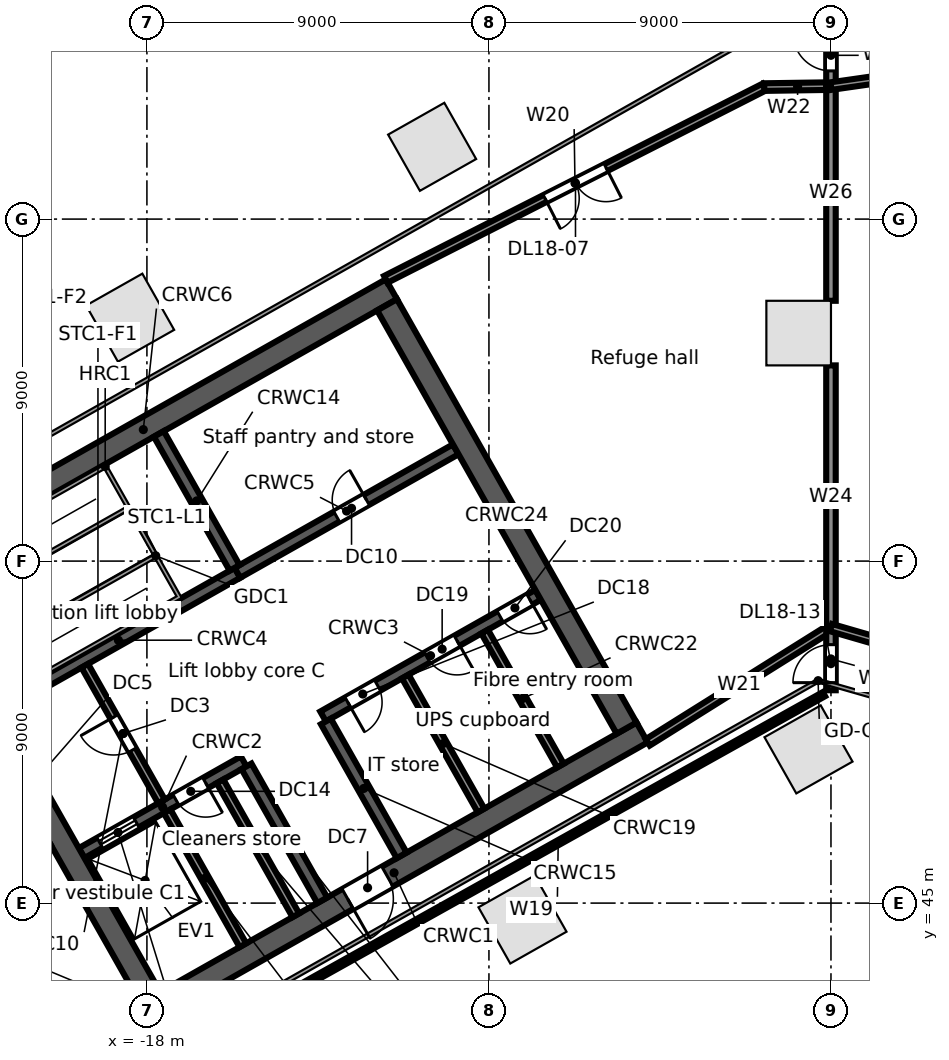
"""IFC4 building model, lengths in metres.
Left out: names, types, materials, properties, quantities, classifications, styles, units other than length and angle.
Written with IfcOpenShell. Run it as: python <this file> out.ifc"""

import sys

from ifc_helpers import new_model, si_unit, direction, frame, frame_2d, origin, origin_2d, place, context, subcontext, project, spatial, rectangle, extrude, element, fill, save


model = new_model("IFC4")
c1 = context("Model", 3, precision=1e-05, world=origin(), true_north=direction((0.0, 1.0)))
c2 = subcontext(c1, "Body", "Model", "MODEL_VIEW")
j1 = project(units=[si_unit("LENGTHUNIT", "METRE"), si_unit("PLANEANGLEUNIT", "RADIAN")], contexts=[c1])
p1 = place(None, origin())
s1 = spatial("IfcSite", under=j1, at=p1, CompositionType="ELEMENT")
p2 = place(p1, origin())
s2 = spatial("IfcBuilding", under=s1, at=p2, CompositionType="ELEMENT")
p3 = place(p2, frame((0.0, 0.0, 91.5)))
s3 = spatial("IfcBuildingStorey", under=s2, at=p3, CompositionType="ELEMENT", Elevation=91.5)
for number, where, z_axis, x_axis in (
    (1, (-10.495, 64.902, 0.0), (0.0, 0.0, 1.0), (-0.87, -0.492, 0.0)),
    (2, (-18.441, 60.406, 0.0), (0.0, 0.0, 1.0), (-0.87, -0.492, 0.0)),
    (3, (-8.117, 44.568, 0.0), (0.0, 0.0, 1.0), (0.87, 0.492, 0.0)),
    (4, (-0.591, 49.044, 0.0), (0.0, 0.0, 1.0), (0.87, 0.492, 0.0)),
    (5, (-0.85, 60.0, 0.0), (0.0, 0.0, 1.0), (0.0, 1.0, 0.0)),
):
    element("IfcColumn", number, at=place(p3, frame(where, z_axis=z_axis, x_axis=x_axis)), inside=s3, PredefinedType="COLUMN", context=c2, shape_type="SweptSolid", body=[
        extrude(rectangle(XDim=1.7, YDim=1.7, at=origin_2d()), origin(), (0.0, 0.0, 1.0), 5.6),
    ])
p4 = place(p3, frame((-18.024, 42.104, 0.0), z_axis=(0.0, 0.0, 1.0), x_axis=(0.870360574057, 0.492414937962, 0.0)))
e6 = element("IfcWall", 6, at=p4, inside=s3, PredefinedType="SOLIDWALL", context=c2, shape_type="SweptSolid", body=[
    extrude(rectangle(XDim=15.0, YDim=0.6, at=frame_2d((7.5, 0.0))), origin(), (0.0, 0.0, 1.0), 5.28),
])
p5 = place(p4, frame((6.1, 0.0, 0.0)))
e7 = element("IfcOpeningElement", 7, at=p5, cuts=e6, PredefinedType="OPENING", context=c2, shape_type="SweptSolid", body=[
    extrude(rectangle(XDim=1.2, YDim=2.1, at=frame_2d((0.6, 1.05))), frame((0.0, 0.31, 0.0), z_axis=(0.0, -1.0, 0.0), x_axis=(1.0, 0.0, 0.0)), (0.0, 0.0, 1.0), 0.62),
])
p6 = place(p3, frame((-19.718, 46.316, 0.0), z_axis=(0.0, 0.0, 1.0), x_axis=(0.870353963862, 0.492426621528, 0.0)))
e8 = element("IfcWall", 8, at=p6, inside=s3, PredefinedType="SOLIDWALL", context=c2, shape_type="SweptSolid", body=[
    extrude(rectangle(XDim=4.9, YDim=0.3, at=frame_2d((2.45, 0.0))), origin(), (0.0, 0.0, 1.0), 5.28),
])
p7 = place(p6, frame((0.55, 0.0, 0.0)))
e9 = element("IfcOpeningElement", 9, at=p7, cuts=e8, PredefinedType="OPENING", context=c2, shape_type="SweptSolid", body=[
    extrude(rectangle(XDim=1.1, YDim=2.1, at=frame_2d((0.55, 1.05))), frame((0.0, 0.16, 0.0), z_axis=(0.0, -1.0, 0.0), x_axis=(1.0, 0.0, 0.0)), (0.0, 0.0, 1.0), 0.32),
])
p8 = place(p6, frame((2.85, 0.0, 0.0)))
e10 = element("IfcOpeningElement", 10, at=p8, cuts=e8, PredefinedType="OPENING", context=c2, shape_type="SweptSolid", body=[
    extrude(rectangle(XDim=0.9, YDim=2.1, at=frame_2d((0.45, 1.05))), frame((0.0, 0.16, 0.0), z_axis=(0.0, -1.0, 0.0), x_axis=(1.0, 0.0, 0.0)), (0.0, 0.0, 1.0), 0.32),
])
p9 = place(p3, frame((-13.365, 49.911, 0.0), z_axis=(0.0, 0.0, 1.0), x_axis=(0.870340995471, 0.49244954219, 0.0)))
e11 = element("IfcWall", 11, at=p9, inside=s3, PredefinedType="SOLIDWALL", context=c2, shape_type="SweptSolid", body=[
    extrude(rectangle(XDim=6.5, YDim=0.3, at=frame_2d((3.25, 0.0))), origin(), (0.0, 0.0, 1.0), 5.28),
])
p10 = place(p9, frame((0.75, 0.0, 0.0)))
e12 = element("IfcOpeningElement", 12, at=p10, cuts=e11, PredefinedType="OPENING", context=c2, shape_type="SweptSolid", body=[
    extrude(rectangle(XDim=0.9, YDim=2.1, at=frame_2d((0.45, 1.05))), frame((0.0, 0.16, 0.0), z_axis=(0.0, -1.0, 0.0), x_axis=(1.0, 0.0, 0.0)), (0.0, 0.0, 1.0), 0.32),
])
p11 = place(p9, frame((3.15, 0.0, 0.0)))
e13 = element("IfcOpeningElement", 13, at=p11, cuts=e11, PredefinedType="OPENING", context=c2, shape_type="SweptSolid", body=[
    extrude(rectangle(XDim=0.9, YDim=2.1, at=frame_2d((0.45, 1.05))), frame((0.0, 0.16, 0.0), z_axis=(0.0, -1.0, 0.0), x_axis=(1.0, 0.0, 0.0)), (0.0, 0.0, 1.0), 0.32),
])
p12 = place(p9, frame((5.35, 0.0, 0.0)))
e14 = element("IfcOpeningElement", 14, at=p12, cuts=e11, PredefinedType="OPENING", context=c2, shape_type="SweptSolid", body=[
    extrude(rectangle(XDim=0.9, YDim=2.1, at=frame_2d((0.45, 1.05))), frame((0.0, 0.16, 0.0), z_axis=(0.0, -1.0, 0.0), x_axis=(1.0, 0.0, 0.0)), (0.0, 0.0, 1.0), 0.32),
])
p13 = place(p3, frame((-21.885, 50.146, 0.0), z_axis=(0.0, 0.0, 1.0), x_axis=(0.870359411463, 0.492416992881, 0.0)))
e15 = element("IfcWall", 15, at=p13, inside=s3, PredefinedType="SOLIDWALL", context=c2, shape_type="SweptSolid", body=[
    extrude(rectangle(XDim=7.2, YDim=0.3, at=frame_2d((3.6, 0.0))), origin(), (0.0, 0.0, 1.0), 5.28),
])
p14 = place(p13, frame((0.2, 0.0, 0.0)))
e16 = element("IfcOpeningElement", 16, at=p14, cuts=e15, PredefinedType="OPENING", context=c2, shape_type="SweptSolid", body=[
    extrude(rectangle(XDim=1.0, YDim=2.1, at=frame_2d((0.5, 1.05))), frame((0.0, 0.16, 0.0), z_axis=(0.0, -1.0, 0.0), x_axis=(1.0, 0.0, 0.0)), (0.0, 0.0, 1.0), 0.32),
])
p15 = place(p3, frame((-15.618, 53.691, 0.0), z_axis=(0.0, 0.0, 1.0), x_axis=(0.870356769198, 0.492421663121, 0.0)))
e17 = element("IfcWall", 17, at=p15, inside=s3, PredefinedType="SOLIDWALL", context=c2, shape_type="SweptSolid", body=[
    extrude(rectangle(XDim=6.6, YDim=0.3, at=frame_2d((3.3, 0.0))), origin(), (0.0, 0.0, 1.0), 5.28),
])
p16 = place(p15, frame((3.0, 0.0, 0.0)))
e18 = element("IfcOpeningElement", 18, at=p16, cuts=e17, PredefinedType="OPENING", context=c2, shape_type="SweptSolid", body=[
    extrude(rectangle(XDim=0.9, YDim=2.1, at=frame_2d((0.45, 1.05))), frame((0.0, 0.16, 0.0), z_axis=(0.0, -1.0, 0.0), x_axis=(1.0, 0.0, 0.0)), (0.0, 0.0, 1.0), 0.32),
])
p17 = place(p3, frame((-24.623, 53.767, 0.0), z_axis=(0.0, 0.0, 1.0), x_axis=(0.870356627484, 0.492421913601, 0.0)))
e19 = element("IfcWall", 19, at=p17, inside=s3, PredefinedType="SOLIDWALL", context=c2, shape_type="SweptSolid", body=[
    extrude(rectangle(XDim=15.0, YDim=0.6, at=frame_2d((7.5, 0.0))), origin(), (0.0, 0.0, 1.0), 5.28),
])
p18 = place(p3, frame((-24.214, 53.654, 0.0), z_axis=(0.0, 0.0, 1.0), x_axis=(0.492441221355, -0.870345703448, 0.0)))
e20 = element("IfcWall", 20, at=p18, inside=s3, PredefinedType="SOLIDWALL", context=c2, shape_type="SweptSolid", body=[
    extrude(rectangle(XDim=12.8, YDim=0.6, at=frame_2d((6.4, 0.0))), origin(), (0.0, 0.0, 1.0), 5.28),
])
p19 = place(p18, frame((5.8, 0.0, 0.0)))
e21 = element("IfcOpeningElement", 21, at=p19, cuts=e20, PredefinedType="OPENING", context=c2, shape_type="SweptSolid", body=[
    extrude(rectangle(XDim=1.2, YDim=2.1, at=frame_2d((0.6, 1.05))), frame((0.0, 0.31, 0.0), z_axis=(0.0, -1.0, 0.0), x_axis=(1.0, 0.0, 0.0)), (0.0, 0.0, 1.0), 0.62),
])
p20 = place(p3, frame((-17.469, 47.417, 0.0), z_axis=(0.0, 0.0, 1.0), x_axis=(0.492440575896, -0.870346068648, 0.0)))
e22 = element("IfcWall", 22, at=p20, inside=s3, PredefinedType="SOLIDWALL", context=c2, shape_type="SweptSolid", body=[
    extrude(rectangle(XDim=4.05, YDim=0.2, at=frame_2d((2.025, 0.0))), origin(), (0.0, 0.0, 1.0), 5.28),
])
p21 = place(p3, frame((-19.635, 51.246, 0.0), z_axis=(0.0, 0.0, 1.0), x_axis=(0.492408451753, -0.87036424366, 0.0)))
e23 = element("IfcWall", 23, at=p21, inside=s3, PredefinedType="PARTITIONING", context=c2, shape_type="SweptSolid", body=[
    extrude(rectangle(XDim=4.1, YDim=0.2, at=frame_2d((2.05, 0.0))), origin(), (0.0, 0.0, 1.0), 5.28),
])
p22 = place(p21, frame((1.55, 0.0, 0.0)))
e24 = element("IfcOpeningElement", 24, at=p22, cuts=e23, PredefinedType="OPENING", context=c2, shape_type="SweptSolid", body=[
    extrude(rectangle(XDim=1.0, YDim=2.1, at=frame_2d((0.5, 1.05))), frame((0.0, 0.11, 0.0), z_axis=(0.0, -1.0, 0.0), x_axis=(1.0, 0.0, 0.0)), (0.0, 0.0, 1.0), 0.22),
])
p23 = place(p3, frame((-16.076, 48.205, 0.0), z_axis=(0.0, 0.0, 1.0), x_axis=(0.492394910396, -0.870371904542, 0.0)))
e25 = element("IfcWall", 25, at=p23, inside=s3, PredefinedType="SOLIDWALL", context=c2, shape_type="SweptSolid", body=[
    extrude(rectangle(XDim=4.05, YDim=0.2, at=frame_2d((2.025, 0.0))), origin(), (0.0, 0.0, 1.0), 5.28),
])
p24 = place(p3, frame((-15.379, 48.599, 0.0), z_axis=(0.0, 0.0, 1.0), x_axis=(0.492394910396, -0.870371904542, 0.0)))
e26 = element("IfcWall", 26, at=p24, inside=s3, PredefinedType="SOLIDWALL", context=c2, shape_type="SweptSolid", body=[
    extrude(rectangle(XDim=4.05, YDim=0.3, at=frame_2d((2.025, 0.0))), origin(), (0.0, 0.0, 1.0), 5.28),
])
p25 = place(p3, frame((-17.686, 57.347, 0.0), z_axis=(0.0, 0.0, 1.0), x_axis=(0.492420746998, -0.870357287513, 0.0)))
e27 = element("IfcWall", 27, at=p25, inside=s3, PredefinedType="SOLIDWALL", context=c2, shape_type="SweptSolid", body=[
    extrude(rectangle(XDim=4.05, YDim=0.3, at=frame_2d((2.025, 0.0))), origin(), (0.0, 0.0, 1.0), 5.28),
])
p26 = place(p3, frame((-13.291, 49.781, 0.0), z_axis=(0.0, 0.0, 1.0), x_axis=(0.492394910396, -0.870371904542, 0.0)))
e28 = element("IfcWall", 28, at=p26, inside=s3, PredefinedType="SOLIDWALL", context=c2, shape_type="SweptSolid", body=[
    extrude(rectangle(XDim=4.05, YDim=0.3, at=frame_2d((2.025, 0.0))), origin(), (0.0, 0.0, 1.0), 5.28),
])
p27 = place(p3, frame((-11.202, 50.962, 0.0), z_axis=(0.0, 0.0, 1.0), x_axis=(0.49241474071, -0.870360685654, 0.0)))
e29 = element("IfcWall", 29, at=p27, inside=s3, PredefinedType="PARTITIONING", context=c2, shape_type="SweptSolid", body=[
    extrude(rectangle(XDim=4.05, YDim=0.2, at=frame_2d((2.025, 0.0))), origin(), (0.0, 0.0, 1.0), 5.28),
])
p28 = place(p3, frame((-9.113, 52.144, 0.0), z_axis=(0.0, 0.0, 1.0), x_axis=(0.492394910396, -0.870371904542, 0.0)))
e30 = element("IfcWall", 30, at=p28, inside=s3, PredefinedType="PARTITIONING", context=c2, shape_type="SweptSolid", body=[
    extrude(rectangle(XDim=4.05, YDim=0.2, at=frame_2d((2.025, 0.0))), origin(), (0.0, 0.0, 1.0), 5.28),
])
p29 = place(p3, frame((-11.681, 60.744, 0.0), z_axis=(0.0, 0.0, 1.0), x_axis=(0.492426772896, -0.870353878221, 0.0)))
e31 = element("IfcWall", 31, at=p29, inside=s3, PredefinedType="SOLIDWALL", context=c2, shape_type="SweptSolid", body=[
    extrude(rectangle(XDim=12.8, YDim=0.6, at=frame_2d((6.4, 0.0))), origin(), (0.0, 0.0, 1.0), 5.28),
])
p30 = place(p3, frame((-14.169, 42.684, 0.0), z_axis=(0.0, 0.0, 1.0), x_axis=(0.872958370826, 0.487794713793, 0.0)))
e32 = element("IfcWall", 32, at=p30, inside=s3, PredefinedType="PARTITIONING", context=c2, shape_type="SweptSolid", body=[
    extrude(rectangle(XDim=16.019, YDim=0.125, at=frame_2d((8.01, 0.0))), origin(), (0.0, 0.0, 1.0), 4.342),
])
p31 = place(p3, frame((-11.715, 61.414, 0.0), z_axis=(0.0, 0.0, 1.0), x_axis=(0.891505734035, 0.4530094107, 0.0)))
e33 = element("IfcWall", 33, at=p31, inside=s3, PredefinedType="PARTITIONING", context=c2, shape_type="SweptSolid", body=[
    extrude(rectangle(XDim=11.17, YDim=0.2, at=frame_2d((5.585, 0.0))), origin(), (0.0, 0.0, 1.0), 4.36),
])
p32 = place(p31, frame((4.7, 0.0, 0.0)))
e34 = element("IfcOpeningElement", 34, at=p32, cuts=e33, PredefinedType="OPENING", context=c2, shape_type="SweptSolid", body=[
    extrude(rectangle(XDim=1.8, YDim=2.1, at=frame_2d((0.9, 1.05))), frame((0.0, 0.11, 0.0), z_axis=(0.0, -1.0, 0.0), x_axis=(1.0, 0.0, 0.0)), (0.0, 0.0, 1.0), 0.22),
])
p33 = place(p3, frame((-4.821, 49.23, 0.0), z_axis=(0.0, 0.0, 1.0), x_axis=(0.847455386679, 0.530866619396, 0.0)))
e35 = element("IfcWall", 35, at=p33, inside=s3, PredefinedType="PARTITIONING", context=c2, shape_type="SweptSolid", body=[
    extrude(rectangle(XDim=5.689, YDim=0.2, at=frame_2d((2.844, 0.0))), origin(), (0.0, 0.0, 1.0), 4.342),
])
p34 = place(p3, frame((-1.757, 66.474, 0.0), z_axis=(0.0, 0.0, 1.0), x_axis=(0.999891555363, 0.014726761827, 0.0)))
e36 = element("IfcWall", 36, at=p34, inside=s3, PredefinedType="PARTITIONING", context=c2, shape_type="SweptSolid", body=[
    extrude(rectangle(XDim=1.757, YDim=0.2, at=frame_2d((0.879, 0.0))), origin(), (0.0, 0.0, 1.0), 4.552),
])
p35 = place(p3, frame((0.0, 50.601, 0.0), z_axis=(0.0, 0.0, 1.0), x_axis=(0.0, 1.0, 0.0)))
e37 = element("IfcWall", 37, at=p35, inside=s3, PredefinedType="PARTITIONING", context=c2, shape_type="SweptSolid", body=[
    extrude(rectangle(XDim=1.649, YDim=0.25, at=frame_2d((0.824, 0.0))), origin(), (0.0, 0.0, 1.0), 5.28),
])
p36 = place(p35, frame((0.2, 0.0, 0.0)))
e38 = element("IfcOpeningElement", 38, at=p36, cuts=e37, PredefinedType="OPENING", context=c2, shape_type="SweptSolid", body=[
    extrude(rectangle(XDim=1.0, YDim=2.1, at=frame_2d((0.5, 1.05))), frame((0.0, 0.135, 0.0), z_axis=(0.0, -1.0, 0.0), x_axis=(1.0, 0.0, 0.0)), (0.0, 0.0, 1.0), 0.27),
])
p37 = place(p3, frame((0.0, 52.25, 0.0), z_axis=(0.0, 0.0, 1.0), x_axis=(0.0, 1.0, 0.0)))
e39 = element("IfcWall", 39, at=p37, inside=s3, PredefinedType="PARTITIONING", context=c2, shape_type="SweptSolid", body=[
    extrude(rectangle(XDim=6.9, YDim=0.25, at=frame_2d((3.45, 0.0))), origin(), (0.0, 0.0, 1.0), 5.28),
])
p38 = place(p3, frame((0.0, 52.25, 0.0), z_axis=(0.0, 0.0, 1.0), x_axis=(0.960438830998, -0.278491026628, 0.0)))
e40 = element("IfcWall", 40, at=p38, inside=s3, PredefinedType="PARTITIONING", context=c2, shape_type="SweptSolid", body=[
    extrude(rectangle(XDim=17.114, YDim=0.2, at=frame_2d((8.557, 0.0))), origin(), (0.0, 0.0, 1.0), 4.342),
])
p39 = place(p3, frame((0.0, 60.85, 0.0), z_axis=(0.0, 0.0, 1.0), x_axis=(0.0, 1.0, 0.0)))
e41 = element("IfcWall", 41, at=p39, inside=s3, PredefinedType="PARTITIONING", context=c2, shape_type="SweptSolid", body=[
    extrude(rectangle(XDim=5.65, YDim=0.25, at=frame_2d((2.825, 0.0))), origin(), (0.0, 0.0, 1.0), 4.552),
])
p40 = place(p3, frame((0.0, 66.5, 0.0), z_axis=(0.0, 0.0, 1.0), x_axis=(0.0, 1.0, 0.0)))
e42 = element("IfcWall", 42, at=p40, inside=s3, PredefinedType="PARTITIONING", context=c2, shape_type="SweptSolid", body=[
    extrude(rectangle(XDim=1.62, YDim=0.25, at=frame_2d((0.81, 0.0))), origin(), (0.0, 0.0, 1.0), 4.552),
])
p41 = place(p40, frame((0.4, 0.0, 0.0)))
e43 = element("IfcOpeningElement", 43, at=p41, cuts=e42, PredefinedType="OPENING", context=c2, shape_type="SweptSolid", body=[
    extrude(rectangle(XDim=1.0, YDim=2.1, at=frame_2d((0.5, 1.05))), frame((0.0, 0.135, 0.0), z_axis=(0.0, -1.0, 0.0), x_axis=(1.0, 0.0, 0.0)), (0.0, 0.0, 1.0), 0.27),
])
p42 = place(p3, frame((0.0, 66.5, 0.0), z_axis=(0.0, 0.0, 1.0), x_axis=(0.989887165849, 0.1418569663, 0.0)))
e44 = element("IfcWall", 44, at=p42, inside=s3, PredefinedType="PARTITIONING", context=c2, shape_type="SweptSolid", body=[
    extrude(rectangle(XDim=3.06, YDim=0.2, at=frame_2d((1.53, 0.0))), origin(), (0.0, 0.0, 1.0), 4.342),
])
p43 = place(p7, origin())
e45 = element("IfcDoor", 45, at=p43, inside=s3, OperationType="DOUBLE_DOOR_SLIDING", PredefinedType="DOOR", context=c2, shape_type="SweptSolid", body=[
    extrude(rectangle(XDim=1.1, YDim=2.1, at=frame_2d((0.55, 1.05))), frame((0.0, 0.025, 0.0), z_axis=(0.0, -1.0, 0.0), x_axis=(1.0, 0.0, 0.0)), (0.0, 0.0, 1.0), 0.05),
])
fill(e9, e45)
p44 = place(p22, frame((1.0, 0.0, 0.0), z_axis=(0.0, 0.0, 1.0), x_axis=(-1.0, 0.0, 0.0)))
e46 = element("IfcDoor", 46, at=p44, inside=s3, OperationType="SINGLE_SWING_RIGHT", PredefinedType="DOOR", context=c2, shape_type="SweptSolid", body=[
    extrude(rectangle(XDim=1.0, YDim=2.1, at=frame_2d((0.5, 1.05))), frame((0.0, 0.025, 0.0), z_axis=(0.0, -1.0, 0.0), x_axis=(1.0, 0.0, 0.0)), (0.0, 0.0, 1.0), 0.05),
])
fill(e24, e46)
p45 = place(p5, frame((1.2, 0.0, 0.0), z_axis=(0.0, 0.0, 1.0), x_axis=(-1.0, 0.0, 0.0)))
e47 = element("IfcDoor", 47, at=p45, inside=s3, OperationType="SINGLE_SWING_RIGHT", PredefinedType="DOOR", context=c2, shape_type="SweptSolid", body=[
    extrude(rectangle(XDim=1.2, YDim=2.1, at=frame_2d((0.6, 1.05))), frame((0.0, 0.025, 0.0), z_axis=(0.0, -1.0, 0.0), x_axis=(1.0, 0.0, 0.0)), (0.0, 0.0, 1.0), 0.05),
])
fill(e7, e47)
p46 = place(p16, origin())
e48 = element("IfcDoor", 48, at=p46, inside=s3, OperationType="SINGLE_SWING_RIGHT", PredefinedType="DOOR", context=c2, shape_type="SweptSolid", body=[
    extrude(rectangle(XDim=0.9, YDim=2.1, at=frame_2d((0.45, 1.05))), frame((0.0, 0.025, 0.0), z_axis=(0.0, -1.0, 0.0), x_axis=(1.0, 0.0, 0.0)), (0.0, 0.0, 1.0), 0.05),
])
fill(e18, e48)
p47 = place(p8, frame((0.9, 0.0, 0.0), z_axis=(0.0, 0.0, 1.0), x_axis=(-1.0, 0.0, 0.0)))
e49 = element("IfcDoor", 49, at=p47, inside=s3, OperationType="SINGLE_SWING_LEFT", PredefinedType="DOOR", context=c2, shape_type="SweptSolid", body=[
    extrude(rectangle(XDim=0.9, YDim=2.1, at=frame_2d((0.45, 1.05))), frame((0.0, 0.025, 0.0), z_axis=(0.0, -1.0, 0.0), x_axis=(1.0, 0.0, 0.0)), (0.0, 0.0, 1.0), 0.05),
])
fill(e10, e49)
p48 = place(p10, frame((0.9, 0.0, 0.0), z_axis=(0.0, 0.0, 1.0), x_axis=(-1.0, 0.0, 0.0)))
e50 = element("IfcDoor", 50, at=p48, inside=s3, OperationType="SINGLE_SWING_RIGHT", PredefinedType="DOOR", context=c2, shape_type="SweptSolid", body=[
    extrude(rectangle(XDim=0.9, YDim=2.1, at=frame_2d((0.45, 1.05))), frame((0.0, 0.025, 0.0), z_axis=(0.0, -1.0, 0.0), x_axis=(1.0, 0.0, 0.0)), (0.0, 0.0, 1.0), 0.05),
])
fill(e12, e50)
p49 = place(p11, frame((0.9, 0.0, 0.0), z_axis=(0.0, 0.0, 1.0), x_axis=(-1.0, 0.0, 0.0)))
e51 = element("IfcDoor", 51, at=p49, inside=s3, OperationType="SINGLE_SWING_LEFT", PredefinedType="DOOR", context=c2, shape_type="SweptSolid", body=[
    extrude(rectangle(XDim=0.9, YDim=2.1, at=frame_2d((0.45, 1.05))), frame((0.0, 0.025, 0.0), z_axis=(0.0, -1.0, 0.0), x_axis=(1.0, 0.0, 0.0)), (0.0, 0.0, 1.0), 0.05),
])
fill(e13, e51)
p50 = place(p12, frame((0.9, 0.0, 0.0), z_axis=(0.0, 0.0, 1.0), x_axis=(-1.0, 0.0, 0.0)))
e52 = element("IfcDoor", 52, at=p50, inside=s3, OperationType="SINGLE_SWING_LEFT", PredefinedType="DOOR", context=c2, shape_type="SweptSolid", body=[
    extrude(rectangle(XDim=0.9, YDim=2.1, at=frame_2d((0.45, 1.05))), frame((0.0, 0.025, 0.0), z_axis=(0.0, -1.0, 0.0), x_axis=(1.0, 0.0, 0.0)), (0.0, 0.0, 1.0), 0.05),
])
fill(e14, e52)
p51 = place(p32, frame((1.8, 0.0, 0.0), z_axis=(0.0, 0.0, 1.0), x_axis=(-1.0, 0.0, 0.0)))
e53 = element("IfcDoor", 53, at=p51, inside=s3, OperationType="DOUBLE_DOOR_SINGLE_SWING", PredefinedType="DOOR", context=c2, shape_type="SweptSolid", body=[
    extrude(rectangle(XDim=1.8, YDim=2.1, at=frame_2d((0.9, 1.05))), frame((0.0, 0.025, 0.0), z_axis=(0.0, -1.0, 0.0), x_axis=(1.0, 0.0, 0.0)), (0.0, 0.0, 1.0), 0.05),
])
fill(e34, e53)
p52 = place(p36, origin())
e54 = element("IfcDoor", 54, at=p52, inside=s3, OperationType="SINGLE_SWING_LEFT", PredefinedType="DOOR", context=c2, shape_type="SweptSolid", body=[
    extrude(rectangle(XDim=1.0, YDim=2.1, at=frame_2d((0.5, 1.05))), frame((0.0, 0.025, 0.0), z_axis=(0.0, -1.0, 0.0), x_axis=(1.0, 0.0, 0.0)), (0.0, 0.0, 1.0), 0.05),
])
fill(e38, e54)
p53 = place(p41, origin())
e55 = element("IfcDoor", 55, at=p53, inside=s3, OperationType="SINGLE_SWING_RIGHT", PredefinedType="DOOR", context=c2, shape_type="SweptSolid", body=[
    extrude(rectangle(XDim=1.0, YDim=2.1, at=frame_2d((0.5, 1.05))), frame((0.0, 0.025, 0.0), z_axis=(0.0, -1.0, 0.0), x_axis=(1.0, 0.0, 0.0)), (0.0, 0.0, 1.0), 0.05),
])
fill(e43, e55)
save(model, sys.argv[1])
